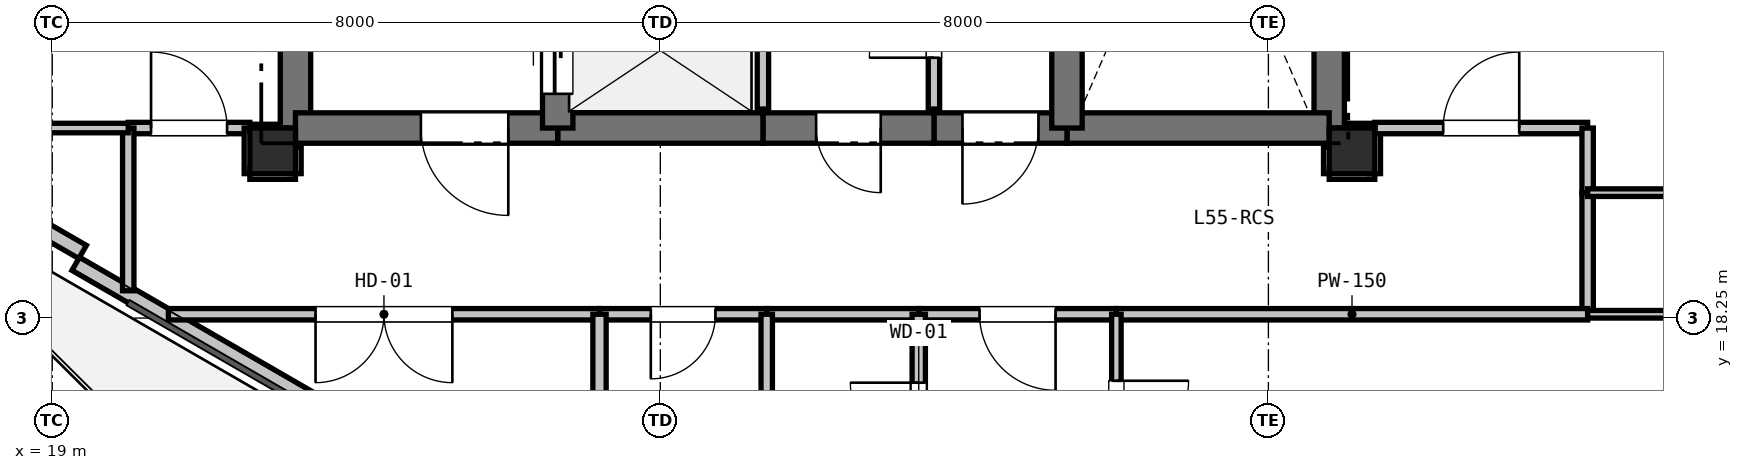
"""IFC4 building model, lengths in metres.
Left out: names, types, materials, properties, quantities, classifications, styles, units other than length and angle.
Written with IfcOpenShell. Run it as: python <this file> out.ifc"""

import sys

from ifc_helpers import new_model, si_unit, direction, frame, frame_2d, origin, origin_2d, place, context, subcontext, project, spatial, rectangle, extrude, element, fill, save


model = new_model("IFC4")
c1 = context("Model", 3, precision=1e-05, world=origin(), true_north=direction((0.0, 1.0)))
c2 = subcontext(c1, "Body", "Model", "MODEL_VIEW")
j1 = project(units=[si_unit("LENGTHUNIT", "METRE"), si_unit("PLANEANGLEUNIT", "RADIAN")], contexts=[c1])
p1 = place(None, origin())
s1 = spatial("IfcSite", under=j1, at=p1, CompositionType="ELEMENT")
p2 = place(p1, origin())
s2 = spatial("IfcBuilding", under=s1, at=p2, CompositionType="ELEMENT")
p3 = place(p2, frame((0.0, 0.0, 198.6)))
s3 = spatial("IfcBuildingStorey", under=s2, at=p3, CompositionType="ELEMENT", Elevation=198.6)
for number, where, z_axis, x_axis in (
    (1, (21.9, 20.45, 0.0), (0.0, 0.0, 1.0), (1.0, 0.0, 0.0)),
    (2, (36.1, 20.45, 0.0), (0.0, 0.0, 1.0), (1.0, 0.0, 0.0)),
):
    element("IfcColumn", number, at=place(p3, frame(where, z_axis=z_axis, x_axis=x_axis)), inside=s3, PredefinedType="COLUMN", context=c2, shape_type="SweptSolid", body=[
        extrude(rectangle(XDim=0.6, YDim=0.6, at=origin_2d()), origin(), (0.0, 0.0, 1.0), 3.3),
    ])
p4 = place(p3, frame((27.102, 14.464, 0.0), z_axis=(0.0, 0.0, 1.0), x_axis=(-0.866020680503, 0.500008180874, 0.0)))
e3 = element("IfcWall", 3, at=p4, inside=s3, PredefinedType="PARAPET", context=c2, shape_type="SweptSolid", body=[
    extrude(rectangle(XDim=8.999, YDim=0.2, at=frame_2d((4.5, 0.0))), origin(), (0.0, 0.0, 1.0), 0.2),
])
p5 = place(p3, frame((19.399, 19.12, 0.0), z_axis=(0.0, 0.0, 1.0), x_axis=(-0.86605165483, 0.499954529098, 0.0)))
e4 = element("IfcWall", 4, at=p5, inside=s3, PredefinedType="PARAPET", context=c2, shape_type="SweptSolid", body=[
    extrude(rectangle(XDim=1.7, YDim=0.2, at=frame_2d((0.85, 0.0))), origin(), (0.0, 0.0, 1.0), 2.69),
])
p6 = place(p3, frame((22.2, 20.75, 0.0), z_axis=(0.0, 0.0, 1.0), x_axis=(0.0, 1.0, 0.0)))
e5 = element("IfcWall", 5, at=p6, inside=s3, PredefinedType="SHEAR", context=c2, shape_type="SweptSolid", body=[
    extrude(rectangle(XDim=4.65, YDim=0.4, at=frame_2d((2.325, 0.0))), origin(), (0.0, 0.0, 1.0), 3.07),
])
p7 = place(p3, frame((35.8, 28.1, 0.0), z_axis=(0.0, 0.0, 1.0), x_axis=(0.0, -1.0, 0.0)))
e6 = element("IfcWall", 6, at=p7, inside=s3, PredefinedType="SHEAR", context=c2, shape_type="SweptSolid", body=[
    extrude(rectangle(XDim=7.35, YDim=0.4, at=frame_2d((3.675, 0.0))), origin(), (0.0, 0.0, 1.0), 3.07),
])
p8 = place(p3, frame((35.8, 20.75, 0.0), z_axis=(0.0, 0.0, 1.0), x_axis=(-1.0, 0.0, 0.0)))
e7 = element("IfcWall", 7, at=p8, inside=s3, PredefinedType="SHEAR", context=c2, shape_type="SweptSolid", body=[
    extrude(rectangle(XDim=3.45, YDim=0.4, at=frame_2d((1.725, 0.0))), origin(), (0.0, 0.0, 1.0), 3.07),
])
p9 = place(p3, frame((32.35, 20.75, 0.0), z_axis=(0.0, 0.0, 1.0), x_axis=(-1.0, 0.0, 0.0)))
e8 = element("IfcWall", 8, at=p9, inside=s3, PredefinedType="SHEAR", context=c2, shape_type="SweptSolid", body=[
    extrude(rectangle(XDim=1.75, YDim=0.4, at=frame_2d((0.875, 0.0))), origin(), (0.0, 0.0, 1.0), 3.07),
])
p10 = place(p9, frame((0.375, 0.0, 0.0)))
e9 = element("IfcOpeningElement", 9, at=p10, cuts=e8, PredefinedType="OPENING", context=c2, shape_type="SweptSolid", body=[
    extrude(rectangle(XDim=1.0, YDim=2.15, at=frame_2d((0.5, 1.075))), frame((0.0, 0.21, 0.0), z_axis=(0.0, -1.0, 0.0), x_axis=(1.0, 0.0, 0.0)), (0.0, 0.0, 1.0), 0.42),
])
p11 = place(p3, frame((30.6, 20.75, 0.0), z_axis=(0.0, 0.0, 1.0), x_axis=(-1.0, 0.0, 0.0)))
e10 = element("IfcWall", 10, at=p11, inside=s3, PredefinedType="SHEAR", context=c2, shape_type="SweptSolid", body=[
    extrude(rectangle(XDim=2.25, YDim=0.4, at=frame_2d((1.125, 0.0))), origin(), (0.0, 0.0, 1.0), 3.07),
])
p12 = place(p11, frame((0.7, 0.0, 0.0)))
e11 = element("IfcOpeningElement", 11, at=p12, cuts=e10, PredefinedType="OPENING", context=c2, shape_type="SweptSolid", body=[
    extrude(rectangle(XDim=0.85, YDim=2.1, at=frame_2d((0.425, 1.05))), frame((0.0, 0.21, 0.0), z_axis=(0.0, -1.0, 0.0), x_axis=(1.0, 0.0, 0.0)), (0.0, 0.0, 1.0), 0.42),
])
p13 = place(p3, frame((28.35, 20.75, 0.0), z_axis=(0.0, 0.0, 1.0), x_axis=(-1.0, 0.0, 0.0)))
e12 = element("IfcWall", 12, at=p13, inside=s3, PredefinedType="SHEAR", context=c2, shape_type="SweptSolid", body=[
    extrude(rectangle(XDim=2.7, YDim=0.4, at=frame_2d((1.35, 0.0))), origin(), (0.0, 0.0, 1.0), 3.07),
])
p14 = place(p3, frame((25.65, 20.75, 0.0), z_axis=(0.0, 0.0, 1.0), x_axis=(-1.0, 0.0, 0.0)))
e13 = element("IfcWall", 13, at=p14, inside=s3, PredefinedType="SHEAR", context=c2, shape_type="SweptSolid", body=[
    extrude(rectangle(XDim=3.45, YDim=0.4, at=frame_2d((1.725, 0.0))), origin(), (0.0, 0.0, 1.0), 3.07),
])
p15 = place(p14, frame((0.65, 0.0, 0.0)))
e14 = element("IfcOpeningElement", 14, at=p15, cuts=e13, PredefinedType="OPENING", context=c2, shape_type="SweptSolid", body=[
    extrude(rectangle(XDim=1.15, YDim=2.15, at=frame_2d((0.575, 1.075))), frame((0.0, 0.21, 0.0), z_axis=(0.0, -1.0, 0.0), x_axis=(1.0, 0.0, 0.0)), (0.0, 0.0, 1.0), 0.42),
])
p16 = place(p3, frame((25.65, 20.75, 0.0), z_axis=(0.0, 0.0, 1.0), x_axis=(0.0, 1.0, 0.0)))
e15 = element("IfcWall", 15, at=p16, inside=s3, PredefinedType="SHEAR", context=c2, shape_type="SweptSolid", body=[
    extrude(rectangle(XDim=2.0, YDim=0.4, at=frame_2d((1.0, 0.0))), origin(), (0.0, 0.0, 1.0), 3.07),
])
p17 = place(p16, frame((0.45, 0.0, 0.0)))
e16 = element("IfcOpeningElement", 16, at=p17, cuts=e15, PredefinedType="OPENING", context=c2, shape_type="SweptSolid", body=[
    extrude(rectangle(XDim=1.1, YDim=2.15, at=frame_2d((0.55, 1.075))), frame((0.0, 0.21, 0.0), z_axis=(0.0, -1.0, 0.0), x_axis=(1.0, 0.0, 0.0)), (0.0, 0.0, 1.0), 0.42),
])
p18 = place(p3, frame((32.35, 20.75, 0.0), z_axis=(0.0, 0.0, 1.0), x_axis=(0.0, 1.0, 0.0)))
e17 = element("IfcWall", 17, at=p18, inside=s3, PredefinedType="SHEAR", context=c2, shape_type="SweptSolid", body=[
    extrude(rectangle(XDim=4.8, YDim=0.4, at=frame_2d((2.4, 0.0))), origin(), (0.0, 0.0, 1.0), 3.07),
])
p19 = place(p3, frame((28.35, 23.2, 0.0), z_axis=(0.0, 0.0, 1.0), x_axis=(0.0, -1.0, 0.0)))
e18 = element("IfcWall", 18, at=p19, inside=s3, PredefinedType="PARTITIONING", context=c2, shape_type="SweptSolid", body=[
    extrude(rectangle(XDim=2.2, YDim=0.15, at=frame_2d((1.1, 0.0))), origin(), (0.0, 0.0, 1.0), 3.07),
])
p20 = place(p3, frame((30.6, 21.0, 0.0), z_axis=(0.0, 0.0, 1.0), x_axis=(0.0, 1.0, 0.0)))
e19 = element("IfcWall", 19, at=p20, inside=s3, PredefinedType="PARTITIONING", context=c2, shape_type="SweptSolid", body=[
    extrude(rectangle(XDim=2.2, YDim=0.15, at=frame_2d((1.1, 0.0))), origin(), (0.0, 0.0, 1.0), 3.07),
])
p21 = place(p20, frame((0.675, 0.0, 0.0)))
e20 = element("IfcOpeningElement", 20, at=p21, cuts=e19, PredefinedType="OPENING", context=c2, shape_type="SweptSolid", body=[
    extrude(rectangle(XDim=0.85, YDim=2.1, at=frame_2d((0.425, 1.05))), frame((0.0, 0.085, 0.0), z_axis=(0.0, -1.0, 0.0), x_axis=(1.0, 0.0, 0.0)), (0.0, 0.0, 1.0), 0.17),
])
p22 = place(p3, frame((20.0, 20.75, 0.0), z_axis=(0.0, 0.0, 1.0), x_axis=(1.0, 0.0, 0.0)))
e21 = element("IfcWall", 21, at=p22, inside=s3, PredefinedType="PARTITIONING", context=c2, shape_type="SweptSolid", body=[
    extrude(rectangle(XDim=1.6, YDim=0.15, at=frame_2d((0.8, 0.0))), origin(), (0.0, 0.0, 1.0), 2.518),
])
p23 = place(p22, frame((0.3, 0.0, 0.0)))
e22 = element("IfcOpeningElement", 22, at=p23, cuts=e21, PredefinedType="OPENING", context=c2, shape_type="SweptSolid", body=[
    extrude(rectangle(XDim=1.0, YDim=2.15, at=frame_2d((0.5, 1.075))), frame((0.0, 0.085, 0.0), z_axis=(0.0, -1.0, 0.0), x_axis=(1.0, 0.0, 0.0)), (0.0, 0.0, 1.0), 0.17),
])
p24 = place(p3, frame((21.6, 20.75, 0.0), z_axis=(0.0, 0.0, 1.0), x_axis=(0.0, -1.0, 0.0)))
e23 = element("IfcWall", 23, at=p24, inside=s3, PredefinedType="PARTITIONING", context=c2, shape_type="SweptSolid", body=[
    extrude(rectangle(XDim=0.6, YDim=0.15, at=frame_2d((0.3, 0.0))), origin(), (0.0, 0.0, 1.0), 2.518),
])
p25 = place(p3, frame((21.6, 20.15, 0.0), z_axis=(0.0, 0.0, 1.0), x_axis=(1.0, 0.0, 0.0)))
e24 = element("IfcWall", 24, at=p25, inside=s3, PredefinedType="PARTITIONING", context=c2, shape_type="SweptSolid", body=[
    extrude(rectangle(XDim=0.6, YDim=0.15, at=frame_2d((0.3, 0.0))), origin(), (0.0, 0.0, 1.0), 2.518),
])
p26 = place(p3, frame((22.2, 20.15, 0.0), z_axis=(0.0, 0.0, 1.0), x_axis=(0.0, 1.0, 0.0)))
e25 = element("IfcWall", 25, at=p26, inside=s3, PredefinedType="PARTITIONING", context=c2, shape_type="SweptSolid", body=[
    extrude(rectangle(XDim=0.35, YDim=0.15, at=frame_2d((0.175, 0.0))), origin(), (0.0, 0.0, 1.0), 2.518),
])
p27 = place(p3, frame((35.8, 20.5, 0.0), z_axis=(0.0, 0.0, 1.0), x_axis=(0.0, -1.0, 0.0)))
e26 = element("IfcWall", 26, at=p27, inside=s3, PredefinedType="PARTITIONING", context=c2, shape_type="SweptSolid", body=[
    extrude(rectangle(XDim=0.35, YDim=0.15, at=frame_2d((0.175, 0.0))), origin(), (0.0, 0.0, 1.0), 2.595),
])
p28 = place(p3, frame((35.8, 20.15, 0.0), z_axis=(0.0, 0.0, 1.0), x_axis=(1.0, 0.0, 0.0)))
e27 = element("IfcWall", 27, at=p28, inside=s3, PredefinedType="PARTITIONING", context=c2, shape_type="SweptSolid", body=[
    extrude(rectangle(XDim=0.6, YDim=0.15, at=frame_2d((0.3, 0.0))), origin(), (0.0, 0.0, 1.0), 2.518),
])
p29 = place(p3, frame((36.4, 20.15, 0.0), z_axis=(0.0, 0.0, 1.0), x_axis=(0.0, 1.0, 0.0)))
e28 = element("IfcWall", 28, at=p29, inside=s3, PredefinedType="PARTITIONING", context=c2, shape_type="SweptSolid", body=[
    extrude(rectangle(XDim=0.6, YDim=0.15, at=frame_2d((0.3, 0.0))), origin(), (0.0, 0.0, 1.0), 2.518),
])
p30 = place(p3, frame((36.4, 20.75, 0.0), z_axis=(0.0, 0.0, 1.0), x_axis=(1.0, 0.0, 0.0)))
e29 = element("IfcWall", 29, at=p30, inside=s3, PredefinedType="PARTITIONING", context=c2, shape_type="SweptSolid", body=[
    extrude(rectangle(XDim=2.8, YDim=0.15, at=frame_2d((1.4, 0.0))), origin(), (0.0, 0.0, 1.0), 3.07),
])
p31 = place(p30, frame((0.9, 0.0, 0.0)))
e30 = element("IfcOpeningElement", 30, at=p31, cuts=e29, PredefinedType="OPENING", context=c2, shape_type="SweptSolid", body=[
    extrude(rectangle(XDim=1.0, YDim=2.15, at=frame_2d((0.5, 1.075))), frame((0.0, 0.085, 0.0), z_axis=(0.0, -1.0, 0.0), x_axis=(1.0, 0.0, 0.0)), (0.0, 0.0, 1.0), 0.17),
])
p32 = place(p3, frame((39.2, 20.75, 0.0), z_axis=(0.0, 0.0, 1.0), x_axis=(0.0, -1.0, 0.0)))
e31 = element("IfcWall", 31, at=p32, inside=s3, PredefinedType="PARTITIONING", context=c2, shape_type="SweptSolid", body=[
    extrude(rectangle(XDim=0.85, YDim=0.15, at=frame_2d((0.425, 0.0))), origin(), (0.0, 0.0, 1.0), 3.07),
])
p33 = place(p3, frame((39.2, 19.9, 0.0), z_axis=(0.0, 0.0, 1.0), x_axis=(0.0, -1.0, 0.0)))
e32 = element("IfcWall", 32, at=p33, inside=s3, PredefinedType="PARTITIONING", context=c2, shape_type="SweptSolid", body=[
    extrude(rectangle(XDim=1.6, YDim=0.15, at=frame_2d((0.8, 0.0))), origin(), (0.0, 0.0, 1.0), 3.07),
])
p34 = place(p3, frame((39.2, 18.3, 0.0), z_axis=(0.0, 0.0, 1.0), x_axis=(-1.0, 0.0, 0.0)))
e33 = element("IfcWall", 33, at=p34, inside=s3, PredefinedType="PARTITIONING", context=c2, shape_type="SweptSolid", body=[
    extrude(rectangle(XDim=6.2, YDim=0.15, at=frame_2d((3.1, 0.0))), origin(), (0.0, 0.0, 1.0), 2.518),
])
p35 = place(p3, frame((33.0, 18.3, 0.0), z_axis=(0.0, 0.0, 1.0), x_axis=(-1.0, 0.0, 0.0)))
e34 = element("IfcWall", 34, at=p35, inside=s3, PredefinedType="PARTITIONING", context=c2, shape_type="SweptSolid", body=[
    extrude(rectangle(XDim=2.6, YDim=0.15, at=frame_2d((1.3, 0.0))), origin(), (0.0, 0.0, 1.0), 3.07),
])
p36 = place(p35, frame((0.8, 0.0, 0.0)))
e35 = element("IfcOpeningElement", 35, at=p36, cuts=e34, PredefinedType="OPENING", context=c2, shape_type="SweptSolid", body=[
    extrude(rectangle(XDim=1.0, YDim=2.15, at=frame_2d((0.5, 1.075))), frame((0.0, 0.085, 0.0), z_axis=(0.0, -1.0, 0.0), x_axis=(1.0, 0.0, 0.0)), (0.0, 0.0, 1.0), 0.17),
])
p37 = place(p3, frame((30.4, 18.3, 0.0), z_axis=(0.0, 0.0, 1.0), x_axis=(-1.0, 0.0, 0.0)))
e36 = element("IfcWall", 36, at=p37, inside=s3, PredefinedType="PARTITIONING", context=c2, shape_type="SweptSolid", body=[
    extrude(rectangle(XDim=2.0, YDim=0.15, at=frame_2d((1.0, 0.0))), origin(), (0.0, 0.0, 1.0), 3.07),
])
p38 = place(p3, frame((28.4, 18.3, 0.0), z_axis=(0.0, 0.0, 1.0), x_axis=(-1.0, 0.0, 0.0)))
e37 = element("IfcWall", 37, at=p38, inside=s3, PredefinedType="PARTITIONING", context=c2, shape_type="SweptSolid", body=[
    extrude(rectangle(XDim=2.2, YDim=0.15, at=frame_2d((1.1, 0.0))), origin(), (0.0, 0.0, 1.0), 3.07),
])
p39 = place(p38, frame((0.675, 0.0, 0.0)))
e38 = element("IfcOpeningElement", 38, at=p39, cuts=e37, PredefinedType="OPENING", context=c2, shape_type="SweptSolid", body=[
    extrude(rectangle(XDim=0.85, YDim=2.1, at=frame_2d((0.425, 1.05))), frame((0.0, 0.085, 0.0), z_axis=(0.0, -1.0, 0.0), x_axis=(1.0, 0.0, 0.0)), (0.0, 0.0, 1.0), 0.17),
])
p40 = place(p3, frame((26.2, 18.3, 0.0), z_axis=(0.0, 0.0, 1.0), x_axis=(-1.0, 0.0, 0.0)))
e39 = element("IfcWall", 39, at=p40, inside=s3, PredefinedType="PARTITIONING", context=c2, shape_type="SweptSolid", body=[
    extrude(rectangle(XDim=5.672, YDim=0.15, at=frame_2d((2.836, 0.0))), origin(), (0.0, 0.0, 1.0), 2.365),
])
p41 = place(p40, frame((1.936, 0.0, 0.0)))
e40 = element("IfcOpeningElement", 40, at=p41, cuts=e39, PredefinedType="OPENING", context=c2, shape_type="SweptSolid", body=[
    extrude(rectangle(XDim=1.8, YDim=2.2, at=frame_2d((0.9, 1.1))), frame((0.0, 0.085, 0.0), z_axis=(0.0, -1.0, 0.0), x_axis=(1.0, 0.0, 0.0)), (0.0, 0.0, 1.0), 0.17),
])
p42 = place(p3, frame((20.0, 18.609, 0.0), z_axis=(0.0, 0.0, 1.0), x_axis=(0.0, 1.0, 0.0)))
e41 = element("IfcWall", 41, at=p42, inside=s3, PredefinedType="PARTITIONING", context=c2, shape_type="SweptSolid", body=[
    extrude(rectangle(XDim=2.141, YDim=0.15, at=frame_2d((1.071, 0.0))), origin(), (0.0, 0.0, 1.0), 2.365),
])
p43 = place(p3, frame((30.4, 15.6, 0.0), z_axis=(0.0, 0.0, 1.0), x_axis=(0.0, 1.0, 0.0)))
e42 = element("IfcWall", 42, at=p43, inside=s3, PredefinedType="PLUMBINGWALL", context=c2, shape_type="SweptSolid", body=[
    extrude(rectangle(XDim=2.7, YDim=0.175, at=frame_2d((1.35, 0.0))), origin(), (0.0, 0.0, 1.0), 3.07),
])
p44 = place(p43, frame((0.9, 0.0, 0.0)))
e43 = element("IfcOpeningElement", 43, at=p44, cuts=e42, PredefinedType="OPENING", context=c2, shape_type="SweptSolid", body=[
    extrude(rectangle(XDim=0.9, YDim=2.1, at=frame_2d((0.45, 1.05))), frame((0.0, 0.097, 0.0), z_axis=(0.0, -1.0, 0.0), x_axis=(1.0, 0.0, 0.0)), (0.0, 0.0, 1.0), 0.195),
])
p45 = place(p3, frame((33.0, 18.3, 0.0), z_axis=(0.0, 0.0, 1.0), x_axis=(0.0, -1.0, 0.0)))
e44 = element("IfcWall", 44, at=p45, inside=s3, PredefinedType="PARTITIONING", context=c2, shape_type="SweptSolid", body=[
    extrude(rectangle(XDim=2.7, YDim=0.125, at=frame_2d((1.35, 0.0))), origin(), (0.0, 0.0, 1.0), 3.07),
])
p46 = place(p45, frame((0.875, 0.0, 0.0)))
e45 = element("IfcOpeningElement", 45, at=p46, cuts=e44, PredefinedType="OPENING", context=c2, shape_type="SweptSolid", body=[
    extrude(rectangle(XDim=0.95, YDim=2.1, at=frame_2d((0.475, 1.05))), frame((0.0, 0.073, 0.0), z_axis=(0.0, -1.0, 0.0), x_axis=(1.0, 0.0, 0.0)), (0.0, 0.0, 1.0), 0.145),
])
p47 = place(p3, frame((26.2, 15.6, 0.0), z_axis=(0.0, 0.0, 1.0), x_axis=(0.0, 1.0, 0.0)))
e46 = element("IfcWall", 46, at=p47, inside=s3, PredefinedType="PLUMBINGWALL", context=c2, shape_type="SweptSolid", body=[
    extrude(rectangle(XDim=2.7, YDim=0.175, at=frame_2d((1.35, 0.0))), origin(), (0.0, 0.0, 1.0), 2.365),
])
p48 = place(p3, frame((28.4, 18.3, 0.0), z_axis=(0.0, 0.0, 1.0), x_axis=(0.0, -1.0, 0.0)))
e47 = element("IfcWall", 47, at=p48, inside=s3, PredefinedType="PARTITIONING", context=c2, shape_type="SweptSolid", body=[
    extrude(rectangle(XDim=2.7, YDim=0.15, at=frame_2d((1.35, 0.0))), origin(), (0.0, 0.0, 1.0), 3.07),
])
p49 = place(p3, frame((39.2, 18.3, 0.0), z_axis=(0.0, 0.0, 1.0), x_axis=(1.0, 0.0, 0.0)))
e48 = element("IfcWall", 48, at=p49, inside=s3, PredefinedType="PARTITIONING", context=c2, shape_type="SweptSolid", body=[
    extrude(rectangle(XDim=1.252, YDim=0.1, at=frame_2d((0.626, 0.0))), origin(), (0.0, 0.0, 1.0), 2.365),
])
p50 = place(p3, frame((21.95, 20.75, 0.0), z_axis=(0.0, 0.0, 1.0), x_axis=(-1.0, 0.0, 0.0)))
e49 = element("IfcWall", 49, at=p50, inside=s3, PredefinedType="PARTITIONING", context=c2, shape_type="SweptSolid", body=[
    extrude(rectangle(XDim=0.35, YDim=0.1, at=frame_2d((0.175, 0.0))), origin(), (0.0, 0.0, 1.0), 2.595),
])
p51 = place(p3, frame((20.0, 20.75, 0.0), z_axis=(0.0, 0.0, 1.0), x_axis=(-1.0, 0.0, 0.0)))
e50 = element("IfcWall", 50, at=p51, inside=s3, PredefinedType="PARTITIONING", context=c2, shape_type="SweptSolid", body=[
    extrude(rectangle(XDim=3.5, YDim=0.125, at=frame_2d((1.75, 0.0))), origin(), (0.0, 0.0, 1.0), 2.365),
])
p52 = place(p3, frame((36.4, 20.75, 0.0), z_axis=(0.0, 0.0, 1.0), x_axis=(-1.0, 0.0, 0.0)))
e51 = element("IfcWall", 51, at=p52, inside=s3, PredefinedType="PARTITIONING", context=c2, shape_type="SweptSolid", body=[
    extrude(rectangle(XDim=0.35, YDim=0.125, at=frame_2d((0.175, 0.0))), origin(), (0.0, 0.0, 1.0), 2.595),
])
p53 = place(p3, frame((40.452, 19.9, 0.0), z_axis=(0.0, 0.0, 1.0), x_axis=(-1.0, 0.0, 0.0)))
e52 = element("IfcWall", 52, at=p53, inside=s3, PredefinedType="PARTITIONING", context=c2, shape_type="SweptSolid", body=[
    extrude(rectangle(XDim=1.252, YDim=0.1, at=frame_2d((0.626, 0.0))), origin(), (0.0, 0.0, 1.0), 2.365),
])
p54 = place(p10, origin())
e53 = element("IfcDoor", 53, at=p54, inside=s3, OperationType="SINGLE_SWING_RIGHT", PredefinedType="DOOR", context=c2, shape_type="SweptSolid", body=[
    extrude(rectangle(XDim=1.0, YDim=2.15, at=frame_2d((0.5, 1.075))), frame((0.0, 0.025, 0.0), z_axis=(0.0, -1.0, 0.0), x_axis=(1.0, 0.0, 0.0)), (0.0, 0.0, 1.0), 0.05),
])
fill(e9, e53)
p55 = place(p17, origin())
e54 = element("IfcDoor", 54, at=p55, inside=s3, OperationType="SLIDING_TO_LEFT", PredefinedType="DOOR", context=c2, shape_type="SweptSolid", body=[
    extrude(rectangle(XDim=1.1, YDim=2.15, at=frame_2d((0.55, 1.075))), frame((0.0, 0.025, 0.0), z_axis=(0.0, -1.0, 0.0), x_axis=(1.0, 0.0, 0.0)), (0.0, 0.0, 1.0), 0.05),
])
fill(e16, e54)
p56 = place(p15, origin())
e55 = element("IfcDoor", 55, at=p56, inside=s3, OperationType="SINGLE_SWING_LEFT", PredefinedType="DOOR", context=c2, shape_type="SweptSolid", body=[
    extrude(rectangle(XDim=1.15, YDim=2.15, at=frame_2d((0.575, 1.075))), frame((0.0, 0.025, 0.0), z_axis=(0.0, -1.0, 0.0), x_axis=(1.0, 0.0, 0.0)), (0.0, 0.0, 1.0), 0.05),
])
fill(e14, e55)
p57 = place(p21, origin())
e56 = element("IfcDoor", 56, at=p57, inside=s3, OperationType="SINGLE_SWING_LEFT", PredefinedType="DOOR", context=c2, shape_type="SweptSolid", body=[
    extrude(rectangle(XDim=0.85, YDim=2.1, at=frame_2d((0.425, 1.05))), frame((0.0, 0.025, 0.0), z_axis=(0.0, -1.0, 0.0), x_axis=(1.0, 0.0, 0.0)), (0.0, 0.0, 1.0), 0.05),
])
fill(e20, e56)
p58 = place(p36, origin())
e57 = element("IfcDoor", 57, at=p58, inside=s3, OperationType="SINGLE_SWING_LEFT", PredefinedType="DOOR", context=c2, shape_type="SweptSolid", body=[
    extrude(rectangle(XDim=1.0, YDim=2.15, at=frame_2d((0.5, 1.075))), frame((0.0, 0.025, 0.0), z_axis=(0.0, -1.0, 0.0), x_axis=(1.0, 0.0, 0.0)), (0.0, 0.0, 1.0), 0.05),
])
fill(e35, e57)
p59 = place(p39, origin())
e58 = element("IfcDoor", 58, at=p59, inside=s3, OperationType="SINGLE_SWING_RIGHT", PredefinedType="DOOR", context=c2, shape_type="SweptSolid", body=[
    extrude(rectangle(XDim=0.85, YDim=2.1, at=frame_2d((0.425, 1.05))), frame((0.0, 0.025, 0.0), z_axis=(0.0, -1.0, 0.0), x_axis=(1.0, 0.0, 0.0)), (0.0, 0.0, 1.0), 0.05),
])
fill(e38, e58)
p60 = place(p12, origin())
e59 = element("IfcDoor", 59, at=p60, inside=s3, OperationType="SINGLE_SWING_LEFT", PredefinedType="DOOR", context=c2, shape_type="SweptSolid", body=[
    extrude(rectangle(XDim=0.85, YDim=2.1, at=frame_2d((0.425, 1.05))), frame((0.0, 0.025, 0.0), z_axis=(0.0, -1.0, 0.0), x_axis=(1.0, 0.0, 0.0)), (0.0, 0.0, 1.0), 0.05),
])
fill(e11, e59)
p61 = place(p41, origin())
e60 = element("IfcDoor", 60, at=p61, inside=s3, OperationType="DOUBLE_DOOR_SINGLE_SWING", PredefinedType="DOOR", context=c2, shape_type="SweptSolid", body=[
    extrude(rectangle(XDim=1.8, YDim=2.2, at=frame_2d((0.9, 1.1))), frame((0.0, 0.025, 0.0), z_axis=(0.0, -1.0, 0.0), x_axis=(1.0, 0.0, 0.0)), (0.0, 0.0, 1.0), 0.05),
])
fill(e40, e60)
p62 = place(p23, origin())
e61 = element("IfcDoor", 61, at=p62, inside=s3, OperationType="SINGLE_SWING_LEFT", PredefinedType="DOOR", context=c2, shape_type="SweptSolid", body=[
    extrude(rectangle(XDim=1.0, YDim=2.15, at=frame_2d((0.5, 1.075))), frame((0.0, 0.025, 0.0), z_axis=(0.0, -1.0, 0.0), x_axis=(1.0, 0.0, 0.0)), (0.0, 0.0, 1.0), 0.05),
])
fill(e22, e61)
p63 = place(p31, origin())
e62 = element("IfcDoor", 62, at=p63, inside=s3, OperationType="SINGLE_SWING_RIGHT", PredefinedType="DOOR", context=c2, shape_type="SweptSolid", body=[
    extrude(rectangle(XDim=1.0, YDim=2.15, at=frame_2d((0.5, 1.075))), frame((0.0, 0.025, 0.0), z_axis=(0.0, -1.0, 0.0), x_axis=(1.0, 0.0, 0.0)), (0.0, 0.0, 1.0), 0.05),
])
fill(e30, e62)
p64 = place(p44, origin())
e63 = element("IfcDoor", 63, at=p64, inside=s3, OperationType="SINGLE_SWING_RIGHT", PredefinedType="DOOR", context=c2, shape_type="SweptSolid", body=[
    extrude(rectangle(XDim=0.9, YDim=2.1, at=frame_2d((0.45, 1.05))), frame((0.0, 0.025, 0.0), z_axis=(0.0, -1.0, 0.0), x_axis=(1.0, 0.0, 0.0)), (0.0, 0.0, 1.0), 0.05),
])
fill(e43, e63)
p65 = place(p46, origin())
e64 = element("IfcDoor", 64, at=p65, inside=s3, OperationType="SINGLE_SWING_LEFT", PredefinedType="DOOR", context=c2, shape_type="SweptSolid", body=[
    extrude(rectangle(XDim=0.95, YDim=2.1, at=frame_2d((0.475, 1.05))), frame((0.0, 0.025, 0.0), z_axis=(0.0, -1.0, 0.0), x_axis=(1.0, 0.0, 0.0)), (0.0, 0.0, 1.0), 0.05),
])
fill(e45, e64)
save(model, sys.argv[1])
